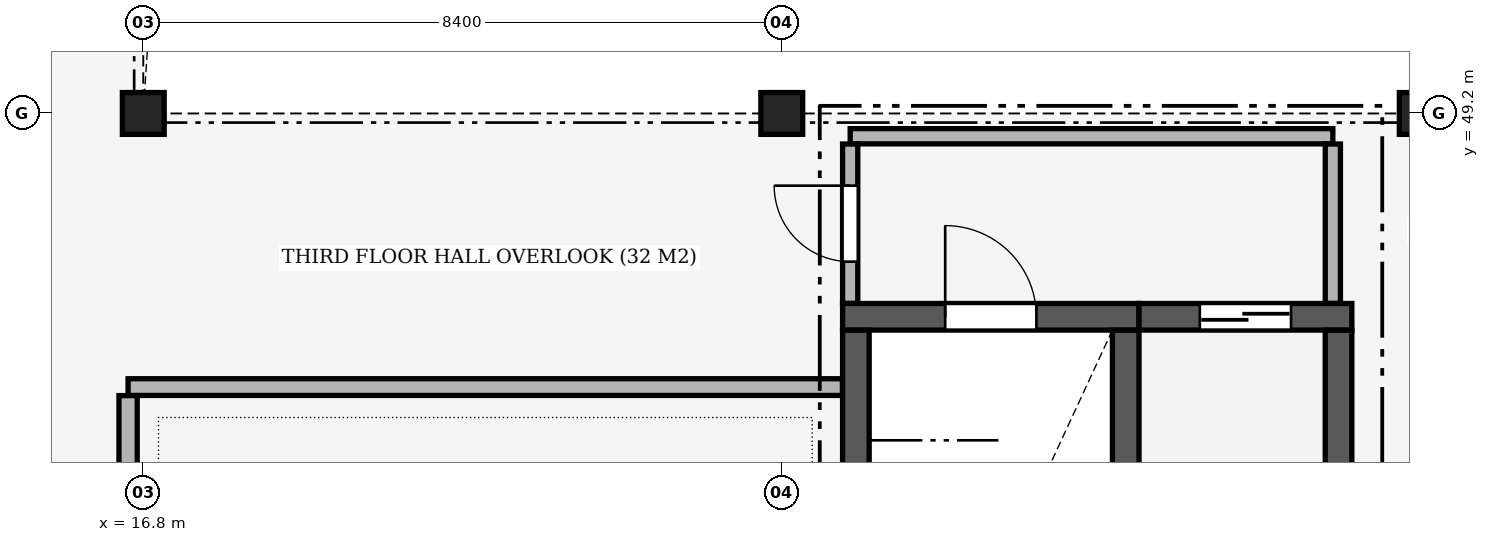
"""IFC4 building model, lengths in metres.
Left out: names, types, materials, properties, quantities, classifications, styles, units other than length and angle.
Written with IfcOpenShell. Run it as: python <this file> out.ifc"""

import sys

from ifc_helpers import new_model, si_unit, direction, frame, frame_2d, origin, origin_2d, place, context, subcontext, project, spatial, rectangle, extrude, element, fill, save


model = new_model("IFC4")
c1 = context("Model", 3, precision=1e-05, world=origin(), true_north=direction((0.0, 1.0)))
c2 = subcontext(c1, "Body", "Model", "MODEL_VIEW")
j1 = project(units=[si_unit("LENGTHUNIT", "METRE"), si_unit("PLANEANGLEUNIT", "RADIAN")], contexts=[c1])
p1 = place(None, origin())
s1 = spatial("IfcSite", under=j1, at=p1, CompositionType="ELEMENT")
p2 = place(p1, origin())
s2 = spatial("IfcBuilding", under=s1, at=p2, CompositionType="ELEMENT")
p3 = place(p2, frame((0.0, 0.0, 15.3)))
s3 = spatial("IfcBuildingStorey", under=s2, at=p3, CompositionType="ELEMENT", Elevation=15.3)
for number, where, z_axis, x_axis in (
    (1, (16.8, 49.2, 0.0), (0.0, 0.0, 1.0), (1.0, 0.0, 0.0)),
    (2, (25.2, 49.2, 0.0), (0.0, 0.0, 1.0), (1.0, 0.0, 0.0)),
    (3, (33.6, 49.2, 0.0), (0.0, 0.0, 1.0), (1.0, 0.0, 0.0)),
):
    element("IfcColumn", number, at=place(p3, frame(where, z_axis=z_axis, x_axis=x_axis)), inside=s3, PredefinedType="COLUMN", context=c2, shape_type="SweptSolid", body=[
        extrude(rectangle(XDim=0.55, YDim=0.55, at=origin_2d()), origin(), (0.0, 0.0, 1.0), 5.1),
    ])
p4 = place(p3, frame((26.0, 46.525, 0.0), z_axis=(0.0, 0.0, 1.0), x_axis=(1.0, 0.0, 0.0)))
e4 = element("IfcWall", 4, at=p4, inside=s3, PredefinedType="SHEAR", context=c2, shape_type="SweptSolid", body=[
    extrude(rectangle(XDim=3.9, YDim=0.35, at=frame_2d((1.95, 0.0))), origin(), (0.0, 0.0, 1.0), 4.84),
])
p5 = place(p4, frame((1.35, 0.0, 0.0)))
e5 = element("IfcOpeningElement", 5, at=p5, cuts=e4, PredefinedType="OPENING", context=c2, shape_type="SweptSolid", body=[
    extrude(rectangle(XDim=1.2, YDim=2.2, at=frame_2d((0.6, 1.1))), frame((0.0, 0.19, 0.0), z_axis=(0.0, -1.0, 0.0), x_axis=(1.0, 0.0, 0.0)), (0.0, 0.0, 1.0), 0.38),
])
for number, where, z_axis, x_axis in (
    (6, (26.175, 39.452, 0.0), (0.0, 0.0, 1.0), (0.0, 1.0, 0.0)),
    (7, (29.725, 39.452, 0.0), (0.0, 0.0, 1.0), (0.0, 1.0, 0.0)),
):
    element("IfcWall", number, at=place(p3, frame(where, z_axis=z_axis, x_axis=x_axis)), inside=s3, PredefinedType="SHEAR", context=c2, shape_type="SweptSolid", body=[
        extrude(rectangle(XDim=6.896, YDim=0.35, at=frame_2d((3.448, 0.0))), origin(), (0.0, 0.0, 1.0), 4.84),
    ])
p6 = place(p3, frame((29.9, 46.525, 0.0), z_axis=(0.0, 0.0, 1.0), x_axis=(1.0, 0.0, 0.0)))
e8 = element("IfcWall", 8, at=p6, inside=s3, PredefinedType="SHEAR", context=c2, shape_type="SweptSolid", body=[
    extrude(rectangle(XDim=2.8, YDim=0.35, at=frame_2d((1.4, 0.0))), origin(), (0.0, 0.0, 1.0), 4.84),
])
p7 = place(p6, frame((0.8, 0.0, 0.0)))
e9 = element("IfcOpeningElement", 9, at=p7, cuts=e8, PredefinedType="OPENING", context=c2, shape_type="SweptSolid", body=[
    extrude(rectangle(XDim=1.2, YDim=2.15, at=frame_2d((0.6, 1.075))), frame((0.0, 0.19, 0.0), z_axis=(0.0, -1.0, 0.0), x_axis=(1.0, 0.0, 0.0)), (0.0, 0.0, 1.0), 0.38),
])
p8 = place(p3, frame((32.525, 43.552, 0.0), z_axis=(0.0, 0.0, 1.0), x_axis=(0.0, 1.0, 0.0)))
e10 = element("IfcWall", 10, at=p8, inside=s3, PredefinedType="SHEAR", context=c2, shape_type="SweptSolid", body=[
    extrude(rectangle(XDim=2.796, YDim=0.35, at=frame_2d((1.398, 0.0))), origin(), (0.0, 0.0, 1.0), 4.84),
])
p9 = place(p3, frame((16.6, 45.6, 0.0), z_axis=(0.0, 0.0, 1.0), x_axis=(1.0, 0.0, 0.0)))
e11 = element("IfcWall", 11, at=p9, inside=s3, PredefinedType="PARTITIONING", context=c2, shape_type="SweptSolid", body=[
    extrude(rectangle(XDim=9.398, YDim=0.22, at=frame_2d((4.699, 0.0))), origin(), (0.0, 0.0, 1.0), 4.14),
])
p10 = place(p3, frame((26.1, 48.9, 0.0), z_axis=(0.0, 0.0, 1.0), x_axis=(1.0, 0.0, 0.0)))
e12 = element("IfcWall", 12, at=p10, inside=s3, PredefinedType="PARTITIONING", context=c2, shape_type="SweptSolid", body=[
    extrude(rectangle(XDim=6.35, YDim=0.2, at=frame_2d((3.175, 0.0))), origin(), (0.0, 0.0, 1.0), 4.14),
])
p11 = place(p3, frame((16.6, 35.4, 0.0), z_axis=(0.0, 0.0, 1.0), x_axis=(0.0, 1.0, 0.0)))
e13 = element("IfcWall", 13, at=p11, inside=s3, PredefinedType="PARTITIONING", context=c2, shape_type="SweptSolid", body=[
    extrude(rectangle(XDim=10.088, YDim=0.24, at=frame_2d((5.044, 0.0))), origin(), (0.0, 0.0, 1.0), 4.14),
])
p12 = place(p11, frame((2.244, 0.0, 0.0)))
e14 = element("IfcOpeningElement", 14, at=p12, cuts=e13, PredefinedType="OPENING", context=c2, shape_type="SweptSolid", body=[
    extrude(rectangle(XDim=1.6, YDim=2.3, at=frame_2d((0.8, 1.15))), frame((0.0, 0.135, 0.0), z_axis=(0.0, -1.0, 0.0), x_axis=(1.0, 0.0, 0.0)), (0.0, 0.0, 1.0), 0.27),
])
p13 = place(p3, frame((26.1, 46.702, 0.0), z_axis=(0.0, 0.0, 1.0), x_axis=(0.0, 1.0, 0.0)))
e15 = element("IfcWall", 15, at=p13, inside=s3, PredefinedType="PARTITIONING", context=c2, shape_type="SweptSolid", body=[
    extrude(rectangle(XDim=2.096, YDim=0.2, at=frame_2d((1.048, 0.0))), origin(), (0.0, 0.0, 1.0), 4.84),
])
p14 = place(p13, frame((0.548, 0.0, 0.0)))
e16 = element("IfcOpeningElement", 16, at=p14, cuts=e15, PredefinedType="OPENING", context=c2, shape_type="SweptSolid", body=[
    extrude(rectangle(XDim=1.0, YDim=2.1, at=frame_2d((0.5, 1.05))), frame((0.0, 0.115, 0.0), z_axis=(0.0, -1.0, 0.0), x_axis=(1.0, 0.0, 0.0)), (0.0, 0.0, 1.0), 0.23),
])
p15 = place(p3, frame((32.45, 46.702, 0.0), z_axis=(0.0, 0.0, 1.0), x_axis=(0.0, 1.0, 0.0)))
e17 = element("IfcWall", 17, at=p15, inside=s3, PredefinedType="PARTITIONING", context=c2, shape_type="SweptSolid", body=[
    extrude(rectangle(XDim=2.096, YDim=0.2, at=frame_2d((1.048, 0.0))), origin(), (0.0, 0.0, 1.0), 4.84),
])
p16 = place(p5, origin())
e18 = element("IfcDoor", 18, at=p16, inside=s3, OperationType="SINGLE_SWING_LEFT", PredefinedType="DOOR", context=c2, shape_type="SweptSolid", body=[
    extrude(rectangle(XDim=1.2, YDim=2.2, at=frame_2d((0.6, 1.1))), frame((0.0, 0.025, 0.0), z_axis=(0.0, -1.0, 0.0), x_axis=(1.0, 0.0, 0.0)), (0.0, 0.0, 1.0), 0.05),
])
fill(e5, e18)
p17 = place(p7, origin())
e19 = element("IfcDoor", 19, at=p17, inside=s3, OperationType="DOUBLE_DOOR_SLIDING", PredefinedType="DOOR", context=c2, shape_type="SweptSolid", body=[
    extrude(rectangle(XDim=1.2, YDim=2.15, at=frame_2d((0.6, 1.075))), frame((0.0, 0.025, 0.0), z_axis=(0.0, -1.0, 0.0), x_axis=(1.0, 0.0, 0.0)), (0.0, 0.0, 1.0), 0.05),
])
fill(e9, e19)
p18 = place(p14, origin())
e20 = element("IfcDoor", 20, at=p18, inside=s3, OperationType="SINGLE_SWING_RIGHT", PredefinedType="DOOR", context=c2, shape_type="SweptSolid", body=[
    extrude(rectangle(XDim=1.0, YDim=2.1, at=frame_2d((0.5, 1.05))), frame((0.0, 0.025, 0.0), z_axis=(0.0, -1.0, 0.0), x_axis=(1.0, 0.0, 0.0)), (0.0, 0.0, 1.0), 0.05),
])
fill(e16, e20)
save(model, sys.argv[1])
